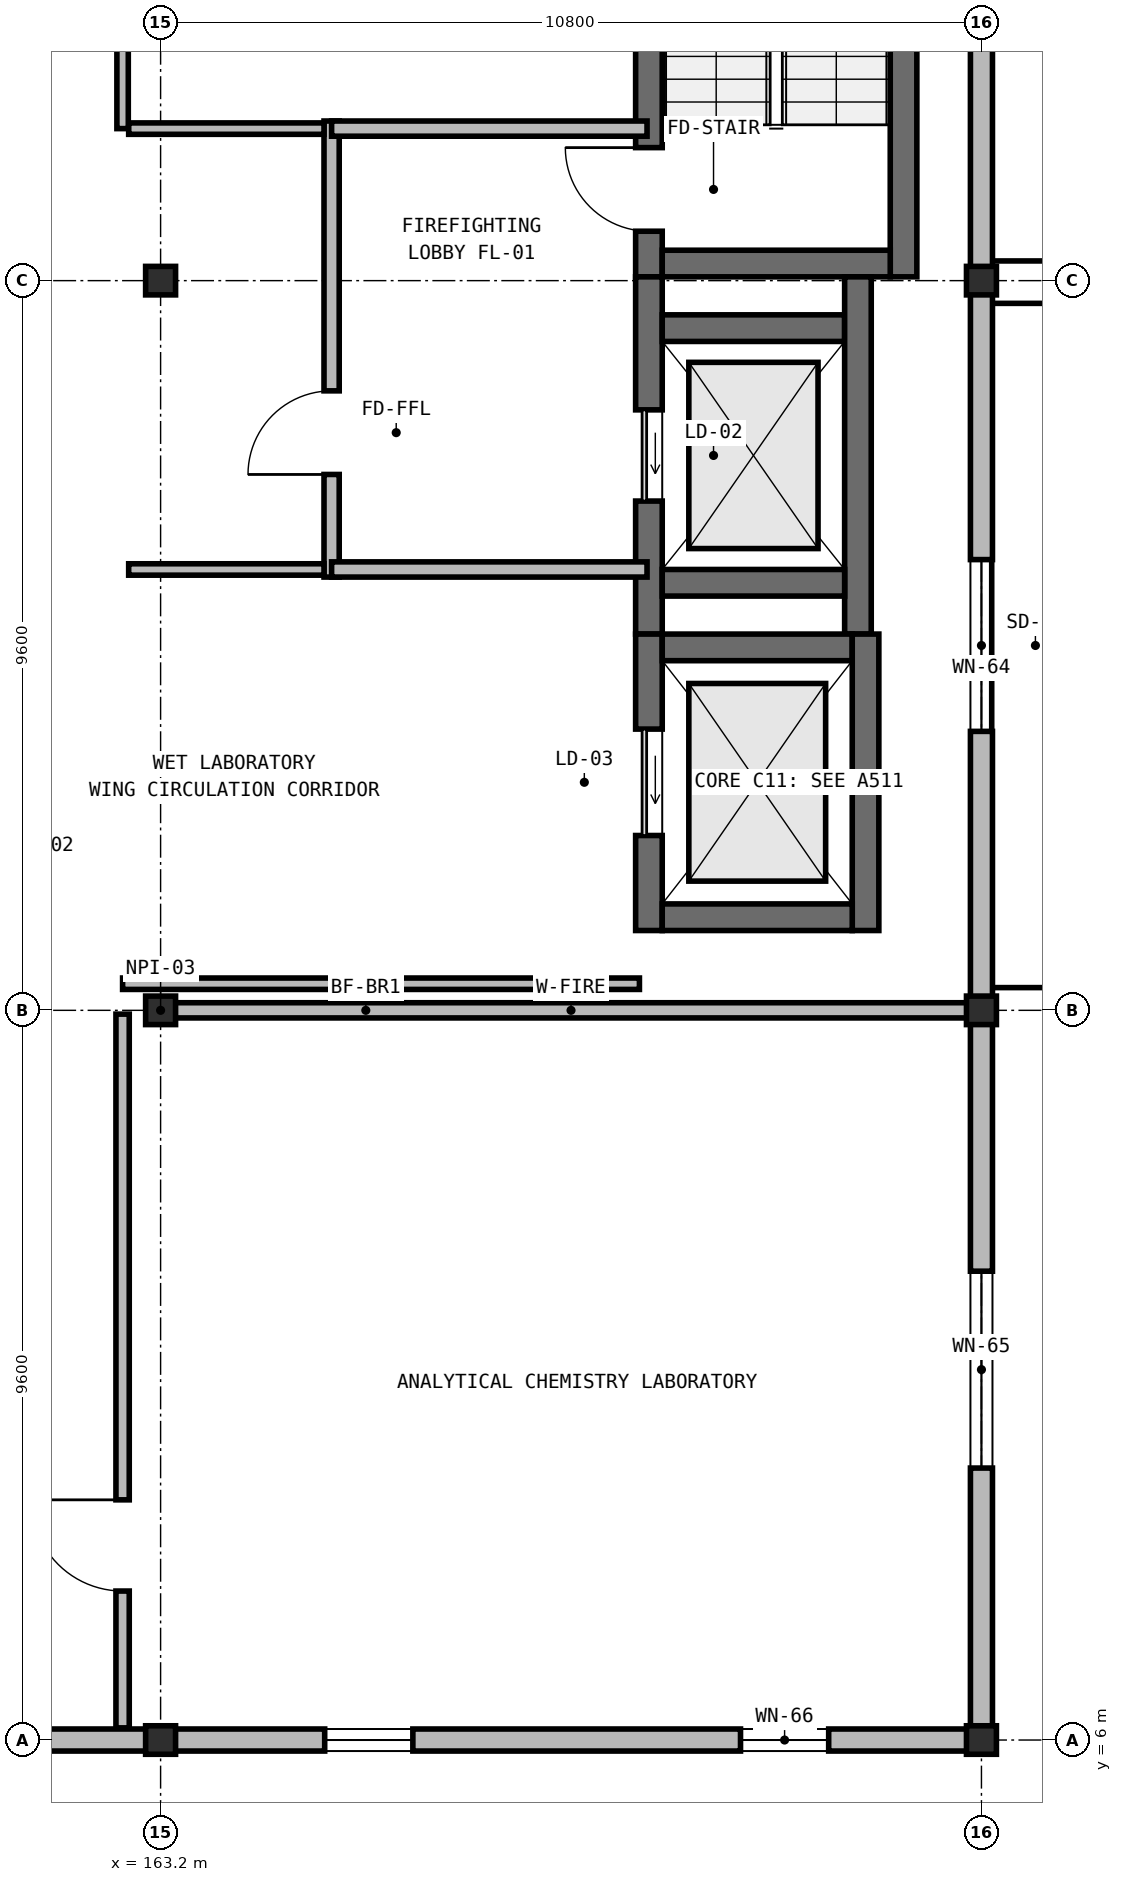
"""IFC4 building model, lengths in metres.
Left out: names, types, materials, properties, quantities, classifications, styles, units other than length and angle.
Written with IfcOpenShell. Run it as: python <this file> out.ifc"""

import sys

from ifc_helpers import new_model, si_unit, direction, frame, frame_2d, origin, origin_2d, place, context, subcontext, project, spatial, rectangle, i_section, extrude, element, fill, save


model = new_model("IFC4")
c1 = context("Model", 3, precision=1e-05, world=origin(), true_north=direction((0.0, 1.0)))
c2 = subcontext(c1, "Body", "Model", "MODEL_VIEW")
j1 = project(units=[si_unit("LENGTHUNIT", "METRE"), si_unit("PLANEANGLEUNIT", "RADIAN")], contexts=[c1])
p1 = place(None, origin())
s1 = spatial("IfcSite", under=j1, at=p1, CompositionType="ELEMENT")
p2 = place(p1, origin())
s2 = spatial("IfcBuilding", under=s1, at=p2, CompositionType="ELEMENT")
p3 = place(p2, frame((0.0, 0.0, 14.35)))
s3 = spatial("IfcBuildingStorey", under=s2, at=p3, CompositionType="ELEMENT", Elevation=14.35)
p4 = place(p3, frame((169.625, 25.25, 0.0), z_axis=(0.0, 0.0, 1.0), x_axis=(0.0, 1.0, 0.0)))
e1 = element("IfcWall", 1, at=p4, inside=s3, PredefinedType="SHEAR", context=c2, shape_type="SweptSolid", body=[
    extrude(rectangle(XDim=8.2, YDim=0.35, at=frame_2d((4.1, 0.0))), origin(), (0.0, 0.0, 1.0), 4.55),
])
p5 = place(p4, frame((0.6, 0.0, 0.0)))
e2 = element("IfcOpeningElement", 2, at=p5, cuts=e1, PredefinedType="OPENING", context=c2, shape_type="SweptSolid", body=[
    extrude(rectangle(XDim=1.1, YDim=2.15, at=frame_2d((0.55, 1.075))), frame((0.0, 0.185, 0.0), z_axis=(0.0, -1.0, 0.0), x_axis=(1.0, 0.0, 0.0)), (0.0, 0.0, 1.0), 0.37),
])
p6 = place(p3, frame((172.975, 33.45, 0.0), z_axis=(0.0, 0.0, 1.0), x_axis=(0.0, -1.0, 0.0)))
e3 = element("IfcWall", 3, at=p6, inside=s3, PredefinedType="SHEAR", context=c2, shape_type="SweptSolid", body=[
    extrude(rectangle(XDim=8.2, YDim=0.35, at=frame_2d((4.1, 0.0))), origin(), (0.0, 0.0, 1.0), 4.55),
])
p7 = place(p3, frame((172.8, 25.425, 0.0), z_axis=(0.0, 0.0, 1.0), x_axis=(-1.0, 0.0, 0.0)))
e4 = element("IfcWall", 4, at=p7, inside=s3, PredefinedType="SHEAR", context=c2, shape_type="SweptSolid", body=[
    extrude(rectangle(XDim=3.0, YDim=0.35, at=frame_2d((1.5, 0.0))), origin(), (0.0, 0.0, 1.0), 4.55),
])
p8 = place(p3, frame((169.625, 20.55, 0.0), z_axis=(0.0, 0.0, 1.0), x_axis=(0.0, 1.0, 0.0)))
e5 = element("IfcWall", 5, at=p8, inside=s3, PredefinedType="SHEAR", context=c2, shape_type="SweptSolid", body=[
    extrude(rectangle(XDim=4.7, YDim=0.35, at=frame_2d((2.35, 0.0))), origin(), (0.0, 0.0, 1.0), 4.55),
])
p9 = place(p8, frame((1.75, 0.0, 0.0)))
e6 = element("IfcOpeningElement", 6, at=p9, cuts=e5, PredefinedType="OPENING", context=c2, shape_type="SweptSolid", body=[
    extrude(rectangle(XDim=1.2, YDim=2.15, at=frame_2d((0.6, 1.075))), frame((0.0, 0.185, 0.0), z_axis=(0.0, -1.0, 0.0), x_axis=(1.0, 0.0, 0.0)), (0.0, 0.0, 1.0), 0.37),
])
p10 = place(p3, frame((169.8, 24.575, 0.0), z_axis=(0.0, 0.0, 1.0), x_axis=(1.0, 0.0, 0.0)))
e7 = element("IfcWall", 7, at=p10, inside=s3, PredefinedType="SHEAR", context=c2, shape_type="SweptSolid", body=[
    extrude(rectangle(XDim=2.4, YDim=0.35, at=frame_2d((1.2, 0.0))), origin(), (0.0, 0.0, 1.0), 4.55),
])
p11 = place(p3, frame((172.375, 25.25, 0.0), z_axis=(0.0, 0.0, 1.0), x_axis=(0.0, -1.0, 0.0)))
e8 = element("IfcWall", 8, at=p11, inside=s3, PredefinedType="SHEAR", context=c2, shape_type="SweptSolid", body=[
    extrude(rectangle(XDim=4.7, YDim=0.35, at=frame_2d((2.35, 0.0))), origin(), (0.0, 0.0, 1.0), 4.55),
])
p12 = place(p3, frame((172.2, 21.225, 0.0), z_axis=(0.0, 0.0, 1.0), x_axis=(-1.0, 0.0, 0.0)))
e9 = element("IfcWall", 9, at=p12, inside=s3, PredefinedType="SHEAR", context=c2, shape_type="SweptSolid", body=[
    extrude(rectangle(XDim=2.4, YDim=0.35, at=frame_2d((1.2, 0.0))), origin(), (0.0, 0.0, 1.0), 4.55),
])
p13 = place(p3, frame((169.625, 16.65, 0.0), z_axis=(0.0, 0.0, 1.0), x_axis=(0.0, 1.0, 0.0)))
e10 = element("IfcWall", 10, at=p13, inside=s3, PredefinedType="SHEAR", context=c2, shape_type="SweptSolid", body=[
    extrude(rectangle(XDim=3.9, YDim=0.35, at=frame_2d((1.95, 0.0))), origin(), (0.0, 0.0, 1.0), 4.55),
])
p14 = place(p13, frame((1.25, 0.0, 0.0)))
e11 = element("IfcOpeningElement", 11, at=p14, cuts=e10, PredefinedType="OPENING", context=c2, shape_type="SweptSolid", body=[
    extrude(rectangle(XDim=1.4, YDim=2.3, at=frame_2d((0.7, 1.15))), frame((0.0, 0.185, 0.0), z_axis=(0.0, -1.0, 0.0), x_axis=(1.0, 0.0, 0.0)), (0.0, 0.0, 1.0), 0.37),
])
p15 = place(p3, frame((169.8, 20.375, 0.0), z_axis=(0.0, 0.0, 1.0), x_axis=(1.0, 0.0, 0.0)))
e12 = element("IfcWall", 12, at=p15, inside=s3, PredefinedType="SHEAR", context=c2, shape_type="SweptSolid", body=[
    extrude(rectangle(XDim=2.5, YDim=0.35, at=frame_2d((1.25, 0.0))), origin(), (0.0, 0.0, 1.0), 4.55),
])
p16 = place(p3, frame((172.475, 20.55, 0.0), z_axis=(0.0, 0.0, 1.0), x_axis=(0.0, -1.0, 0.0)))
e13 = element("IfcWall", 13, at=p16, inside=s3, PredefinedType="SHEAR", context=c2, shape_type="SweptSolid", body=[
    extrude(rectangle(XDim=3.9, YDim=0.35, at=frame_2d((1.95, 0.0))), origin(), (0.0, 0.0, 1.0), 4.55),
])
p17 = place(p3, frame((172.3, 16.825, 0.0), z_axis=(0.0, 0.0, 1.0), x_axis=(-1.0, 0.0, 0.0)))
e14 = element("IfcWall", 14, at=p17, inside=s3, PredefinedType="SHEAR", context=c2, shape_type="SweptSolid", body=[
    extrude(rectangle(XDim=2.5, YDim=0.35, at=frame_2d((1.25, 0.0))), origin(), (0.0, 0.0, 1.0), 4.55),
])
for number, where, z_axis, x_axis in (
    (15, (163.2, 6.0, 0.0), (0.0, 0.0, 1.0), (1.0, 0.0, 0.0)),
    (16, (163.2, 15.6, 0.0), (0.0, 0.0, 1.0), (1.0, 0.0, 0.0)),
    (17, (163.2, 25.2, 0.0), (0.0, 0.0, 1.0), (1.0, 0.0, 0.0)),
    (18, (174.0, 6.0, 0.0), (0.0, 0.0, 1.0), (1.0, 0.0, 0.0)),
    (19, (174.0, 15.6, 0.0), (0.0, 0.0, 1.0), (1.0, 0.0, 0.0)),
    (20, (174.0, 25.2, 0.0), (0.0, 0.0, 1.0), (1.0, 0.0, 0.0)),
):
    element("IfcColumn", number, at=place(p3, frame(where, z_axis=z_axis, x_axis=x_axis)), inside=s3, PredefinedType="COLUMN", context=c2, shape_type="SweptSolid", body=[
        extrude(i_section(OverallWidth=0.394, OverallDepth=0.375, WebThickness=0.02, FlangeThickness=0.032, at=origin_2d()), origin(), (0.0, 0.0, 1.0), 4.55),
    ])
p18 = place(p3, frame((174.0, 34.796, 0.0), z_axis=(0.0, 0.0, 1.0), x_axis=(0.0, -1.0, 0.0)))
e21 = element("IfcWall", 21, at=p18, inside=s3, PredefinedType="SOLIDWALL", context=c2, shape_type="SweptSolid", body=[
    extrude(rectangle(XDim=9.592, YDim=0.29, at=frame_2d((4.796, 0.0))), origin(), (0.0, 0.0, 1.0), 3.884),
])
p19 = place(p18, frame((3.831, 0.0, 0.95)))
e22 = element("IfcOpeningElement", 22, at=p19, cuts=e21, PredefinedType="OPENING", context=c2, shape_type="SweptSolid", body=[
    extrude(rectangle(XDim=1.93, YDim=1.64, at=frame_2d((0.965, 0.82))), frame((0.0, 0.155, 0.0), z_axis=(0.0, -1.0, 0.0), x_axis=(1.0, 0.0, 0.0)), (0.0, 0.0, 1.0), 0.31),
])
p20 = place(p3, frame((174.0, 25.196, 0.0), z_axis=(0.0, 0.0, 1.0), x_axis=(0.0, -1.0, 0.0)))
e23 = element("IfcWall", 23, at=p20, inside=s3, PredefinedType="SOLIDWALL", context=c2, shape_type="SweptSolid", body=[
    extrude(rectangle(XDim=9.592, YDim=0.29, at=frame_2d((4.796, 0.0))), origin(), (0.0, 0.0, 1.0), 3.884),
])
p21 = place(p20, frame((3.666, 0.0, 0.95)))
e24 = element("IfcOpeningElement", 24, at=p21, cuts=e23, PredefinedType="OPENING", context=c2, shape_type="SweptSolid", body=[
    extrude(rectangle(XDim=2.26, YDim=1.56, at=frame_2d((1.13, 0.78))), frame((0.0, 0.155, 0.0), z_axis=(0.0, -1.0, 0.0), x_axis=(1.0, 0.0, 0.0)), (0.0, 0.0, 1.0), 0.31),
])
p22 = place(p3, frame((174.0, 15.596, 0.0), z_axis=(0.0, 0.0, 1.0), x_axis=(0.0, -1.0, 0.0)))
e25 = element("IfcWall", 25, at=p22, inside=s3, PredefinedType="SOLIDWALL", context=c2, shape_type="SweptSolid", body=[
    extrude(rectangle(XDim=9.447, YDim=0.29, at=frame_2d((4.724, 0.0))), origin(), (0.0, 0.0, 1.0), 3.884),
])
p23 = place(p22, frame((3.428, 0.0, 0.95)))
e26 = element("IfcOpeningElement", 26, at=p23, cuts=e25, PredefinedType="OPENING", context=c2, shape_type="SweptSolid", body=[
    extrude(rectangle(XDim=2.59, YDim=1.48, at=frame_2d((1.295, 0.74))), frame((0.0, 0.155, 0.0), z_axis=(0.0, -1.0, 0.0), x_axis=(1.0, 0.0, 0.0)), (0.0, 0.0, 1.0), 0.31),
])
p24 = place(p3, frame((174.145, 6.0, 0.0), z_axis=(0.0, 0.0, 1.0), x_axis=(-1.0, 0.0, 0.0)))
e27 = element("IfcWall", 27, at=p24, inside=s3, PredefinedType="SOLIDWALL", context=c2, shape_type="SweptSolid", body=[
    extrude(rectangle(XDim=10.941, YDim=0.29, at=frame_2d((5.47, 0.0))), origin(), (0.0, 0.0, 1.0), 3.816),
])
p25 = place(p24, frame((2.155, 0.0, 0.95)))
e28 = element("IfcOpeningElement", 28, at=p25, cuts=e27, PredefinedType="OPENING", context=c2, shape_type="SweptSolid", body=[
    extrude(rectangle(XDim=1.16, YDim=1.4, at=frame_2d((0.58, 0.7))), frame((0.0, 0.155, 0.0), z_axis=(0.0, -1.0, 0.0), x_axis=(1.0, 0.0, 0.0)), (0.0, 0.0, 1.0), 0.31),
])
p26 = place(p24, frame((7.626, 0.0, 0.95)))
e29 = element("IfcOpeningElement", 29, at=p26, cuts=e27, PredefinedType="OPENING", context=c2, shape_type="SweptSolid", body=[
    extrude(rectangle(XDim=1.16, YDim=1.4, at=frame_2d((0.58, 0.7))), frame((0.0, 0.155, 0.0), z_axis=(0.0, -1.0, 0.0), x_axis=(1.0, 0.0, 0.0)), (0.0, 0.0, 1.0), 0.31),
])
p27 = place(p3, frame((163.196, 6.0, 0.0), z_axis=(0.0, 0.0, 1.0), x_axis=(-1.0, 0.0, 0.0)))
e30 = element("IfcWall", 30, at=p27, inside=s3, PredefinedType="SOLIDWALL", context=c2, shape_type="SweptSolid", body=[
    extrude(rectangle(XDim=9.741, YDim=0.29, at=frame_2d((4.871, 0.0))), origin(), (0.0, 0.0, 1.0), 3.884),
])
p28 = place(p27, frame((6.396, 0.0, 0.95)))
e31 = element("IfcOpeningElement", 31, at=p28, cuts=e30, PredefinedType="OPENING", context=c2, shape_type="SweptSolid", body=[
    extrude(rectangle(XDim=1.82, YDim=1.72, at=frame_2d((0.91, 0.86))), frame((0.0, 0.155, 0.0), z_axis=(0.0, -1.0, 0.0), x_axis=(1.0, 0.0, 0.0)), (0.0, 0.0, 1.0), 0.31),
])
p29 = place(p3, frame((163.36, 15.6, 0.0), z_axis=(0.0, 0.0, 1.0), x_axis=(1.0, 0.0, 0.0)))
e32 = element("IfcWall", 32, at=p29, inside=s3, PredefinedType="SOLIDWALL", context=c2, shape_type="SweptSolid", body=[
    extrude(rectangle(XDim=10.48, YDim=0.2, at=frame_2d((5.24, 0.0))), origin(), (0.0, 0.0, 1.0), 3.738),
])
p30 = place(p3, frame((165.45, 21.3, 0.0), z_axis=(0.0, 0.0, 1.0), x_axis=(0.0, 1.0, 0.0)))
e33 = element("IfcWall", 33, at=p30, inside=s3, PredefinedType="SOLIDWALL", context=c2, shape_type="SweptSolid", body=[
    extrude(rectangle(XDim=6.0, YDim=0.2, at=frame_2d((3.0, 0.0))), origin(), (0.0, 0.0, 1.0), 4.3),
])
p31 = place(p30, frame((1.35, 0.0, 0.0)))
e34 = element("IfcOpeningElement", 34, at=p31, cuts=e33, PredefinedType="OPENING", context=c2, shape_type="SweptSolid", body=[
    extrude(rectangle(XDim=1.1, YDim=2.15, at=frame_2d((0.55, 1.075))), frame((0.0, 0.11, 0.0), z_axis=(0.0, -1.0, 0.0), x_axis=(1.0, 0.0, 0.0)), (0.0, 0.0, 1.0), 0.22),
])
for number, where, z_axis, x_axis in (
    (35, (165.45, 21.4, 0.0), (0.0, 0.0, 1.0), (1.0, 0.0, 0.0)),
    (36, (165.45, 27.2, 0.0), (0.0, 0.0, 1.0), (1.0, 0.0, 0.0)),
):
    element("IfcWall", number, at=place(p3, frame(where, z_axis=z_axis, x_axis=x_axis)), inside=s3, PredefinedType="SOLIDWALL", context=c2, shape_type="SweptSolid", body=[
        extrude(rectangle(XDim=4.15, YDim=0.2, at=frame_2d((2.075, 0.0))), origin(), (0.0, 0.0, 1.0), 4.3),
    ])
p32 = place(p3, frame((162.78, 27.2, 0.0), z_axis=(0.0, 0.0, 1.0), x_axis=(1.0, 0.0, 0.0)))
e37 = element("IfcWall", 37, at=p32, inside=s3, PredefinedType="PARTITIONING", context=c2, shape_type="SweptSolid", body=[
    extrude(rectangle(XDim=2.57, YDim=0.15, at=frame_2d((1.285, 0.0))), origin(), (0.0, 0.0, 1.0), 4.3),
])
p33 = place(p3, frame((162.7, 27.2, 0.0), z_axis=(0.0, 0.0, 1.0), x_axis=(0.0, 1.0, 0.0)))
e38 = element("IfcWall", 38, at=p33, inside=s3, PredefinedType="PARTITIONING", context=c2, shape_type="SweptSolid", body=[
    extrude(rectangle(XDim=8.92, YDim=0.15, at=frame_2d((4.46, 0.0))), origin(), (0.0, 0.0, 1.0), 4.3),
])
p34 = place(p33, frame((2.6, 0.0, 0.0)))
e39 = element("IfcOpeningElement", 39, at=p34, cuts=e38, PredefinedType="OPENING", context=c2, shape_type="SweptSolid", body=[
    extrude(rectangle(XDim=1.1, YDim=2.2, at=frame_2d((0.55, 1.1))), frame((0.0, 0.085, 0.0), z_axis=(0.0, -1.0, 0.0), x_axis=(1.0, 0.0, 0.0)), (0.0, 0.0, 1.0), 0.17),
])
p35 = place(p3, frame((162.7, 6.16, 0.0), z_axis=(0.0, 0.0, 1.0), x_axis=(0.0, 1.0, 0.0)))
e40 = element("IfcWall", 40, at=p35, inside=s3, PredefinedType="PARTITIONING", context=c2, shape_type="SweptSolid", body=[
    extrude(rectangle(XDim=9.39, YDim=0.175, at=frame_2d((4.695, 0.0))), origin(), (0.0, 0.0, 1.0), 4.3),
])
p36 = place(p35, frame((1.8, 0.0, 0.0)))
e41 = element("IfcOpeningElement", 41, at=p36, cuts=e40, PredefinedType="OPENING", context=c2, shape_type="SweptSolid", body=[
    extrude(rectangle(XDim=1.2, YDim=2.2, at=frame_2d((0.6, 1.1))), frame((0.0, 0.097, 0.0), z_axis=(0.0, -1.0, 0.0), x_axis=(1.0, 0.0, 0.0)), (0.0, 0.0, 1.0), 0.195),
])
p37 = place(p3, frame((162.78, 21.4, 0.0), z_axis=(0.0, 0.0, 1.0), x_axis=(1.0, 0.0, 0.0)))
e42 = element("IfcWall", 42, at=p37, inside=s3, PredefinedType="PARTITIONING", context=c2, shape_type="SweptSolid", body=[
    extrude(rectangle(XDim=2.57, YDim=0.15, at=frame_2d((1.285, 0.0))), origin(), (0.0, 0.0, 1.0), 4.3),
])
p38 = place(p3, frame((162.7, 15.95, 0.0), z_axis=(0.0, 0.0, 1.0), x_axis=(1.0, 0.0, 0.0)))
e43 = element("IfcWall", 43, at=p38, inside=s3, PredefinedType="PARTITIONING", context=c2, shape_type="SweptSolid", body=[
    extrude(rectangle(XDim=6.8, YDim=0.15, at=frame_2d((3.4, 0.0))), origin(), (0.0, 0.0, 1.0), 4.3),
])
p39 = place(p21, origin())
e44 = element("IfcWindow", 44, at=p39, inside=s3, PartitioningType="SINGLE_PANEL", PredefinedType="WINDOW", context=c2, shape_type="SweptSolid", body=[
    extrude(rectangle(XDim=2.26, YDim=1.56, at=frame_2d((1.13, 0.78))), frame((0.0, 0.03, 0.0), z_axis=(0.0, -1.0, 0.0), x_axis=(1.0, 0.0, 0.0)), (0.0, 0.0, 1.0), 0.06),
])
fill(e24, e44)
p40 = place(p23, origin())
e45 = element("IfcWindow", 45, at=p40, inside=s3, PartitioningType="SINGLE_PANEL", PredefinedType="WINDOW", context=c2, shape_type="SweptSolid", body=[
    extrude(rectangle(XDim=2.59, YDim=1.48, at=frame_2d((1.295, 0.74))), frame((0.0, 0.03, 0.0), z_axis=(0.0, -1.0, 0.0), x_axis=(1.0, 0.0, 0.0)), (0.0, 0.0, 1.0), 0.06),
])
fill(e26, e45)
p41 = place(p25, origin())
e46 = element("IfcWindow", 46, at=p41, inside=s3, PartitioningType="SINGLE_PANEL", PredefinedType="WINDOW", context=c2, shape_type="SweptSolid", body=[
    extrude(rectangle(XDim=1.16, YDim=1.4, at=frame_2d((0.58, 0.7))), frame((0.0, 0.03, 0.0), z_axis=(0.0, -1.0, 0.0), x_axis=(1.0, 0.0, 0.0)), (0.0, 0.0, 1.0), 0.06),
])
fill(e28, e46)
p42 = place(p26, origin())
e47 = element("IfcWindow", 47, at=p42, inside=s3, PartitioningType="SINGLE_PANEL", PredefinedType="WINDOW", context=c2, shape_type="SweptSolid", body=[
    extrude(rectangle(XDim=1.16, YDim=1.4, at=frame_2d((0.58, 0.7))), frame((0.0, 0.03, 0.0), z_axis=(0.0, -1.0, 0.0), x_axis=(1.0, 0.0, 0.0)), (0.0, 0.0, 1.0), 0.06),
])
fill(e29, e47)
p43 = place(p5, origin())
e48 = element("IfcDoor", 48, at=p43, inside=s3, OperationType="SINGLE_SWING_RIGHT", PredefinedType="DOOR", context=c2, shape_type="SweptSolid", body=[
    extrude(rectangle(XDim=1.1, YDim=2.15, at=frame_2d((0.55, 1.075))), frame((0.0, 0.025, 0.0), z_axis=(0.0, -1.0, 0.0), x_axis=(1.0, 0.0, 0.0)), (0.0, 0.0, 1.0), 0.05),
])
fill(e2, e48)
p44 = place(p9, origin())
e49 = element("IfcDoor", 49, at=p44, inside=s3, OperationType="SLIDING_TO_LEFT", PredefinedType="USERDEFINED", context=c2, shape_type="SweptSolid", body=[
    extrude(rectangle(XDim=1.2, YDim=2.15, at=frame_2d((0.6, 1.075))), frame((0.0, 0.025, 0.0), z_axis=(0.0, -1.0, 0.0), x_axis=(1.0, 0.0, 0.0)), (0.0, 0.0, 1.0), 0.05),
])
fill(e6, e49)
p45 = place(p14, origin())
e50 = element("IfcDoor", 50, at=p45, inside=s3, OperationType="SLIDING_TO_LEFT", PredefinedType="USERDEFINED", context=c2, shape_type="SweptSolid", body=[
    extrude(rectangle(XDim=1.4, YDim=2.3, at=frame_2d((0.7, 1.15))), frame((0.0, 0.025, 0.0), z_axis=(0.0, -1.0, 0.0), x_axis=(1.0, 0.0, 0.0)), (0.0, 0.0, 1.0), 0.05),
])
fill(e11, e50)
p46 = place(p31, origin())
e51 = element("IfcDoor", 51, at=p46, inside=s3, OperationType="SINGLE_SWING_LEFT", PredefinedType="DOOR", context=c2, shape_type="SweptSolid", body=[
    extrude(rectangle(XDim=1.1, YDim=2.15, at=frame_2d((0.55, 1.075))), frame((0.0, 0.025, 0.0), z_axis=(0.0, -1.0, 0.0), x_axis=(1.0, 0.0, 0.0)), (0.0, 0.0, 1.0), 0.05),
])
fill(e34, e51)
p47 = place(p36, origin())
e52 = element("IfcDoor", 52, at=p47, inside=s3, OperationType="SINGLE_SWING_RIGHT", PredefinedType="DOOR", context=c2, shape_type="SweptSolid", body=[
    extrude(rectangle(XDim=1.2, YDim=2.2, at=frame_2d((0.6, 1.1))), frame((0.0, 0.025, 0.0), z_axis=(0.0, -1.0, 0.0), x_axis=(1.0, 0.0, 0.0)), (0.0, 0.0, 1.0), 0.05),
])
fill(e41, e52)
save(model, sys.argv[1])
